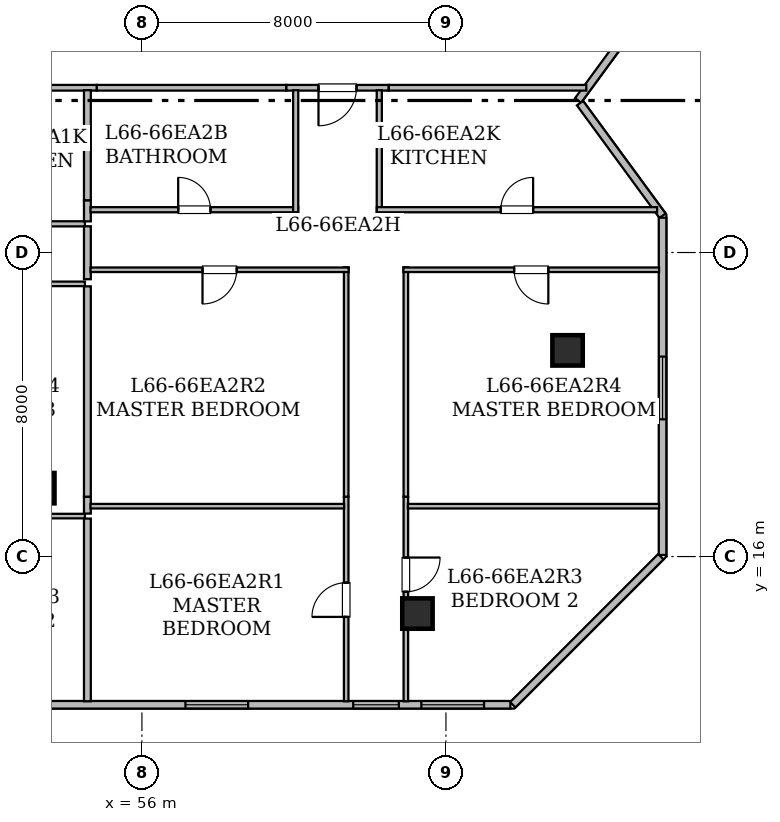
"""IFC4 building model, lengths in metres.
Left out: names, types, materials, properties, quantities, classifications, styles, units other than length and angle.
Written with IfcOpenShell. Run it as: python <this file> out.ifc"""

import sys

from ifc_helpers import new_model, si_unit, direction, frame, frame_2d, origin, origin_2d, place, context, subcontext, project, spatial, rectangle, hollow_rectangle, extrude, element, fill, save


model = new_model("IFC4")
c1 = context("Model", 3, precision=1e-05, world=origin(), true_north=direction((0.0, 1.0)))
c2 = subcontext(c1, "Body", "Model", "MODEL_VIEW")
j1 = project(units=[si_unit("LENGTHUNIT", "METRE"), si_unit("PLANEANGLEUNIT", "RADIAN")], contexts=[c1])
p1 = place(None, origin())
s1 = spatial("IfcSite", under=j1, at=p1, CompositionType="ELEMENT")
p2 = place(p1, origin())
s2 = spatial("IfcBuilding", under=s1, at=p2, CompositionType="ELEMENT")
p3 = place(p2, frame((0.0, 0.0, 257.35)))
s3 = spatial("IfcBuildingStorey", under=s2, at=p3, CompositionType="ELEMENT", Elevation=257.35)
for number, where, z_axis, x_axis in (
    (1, (63.25, 14.5, 0.0), (0.0, 0.0, 1.0), (1.0, 0.0, 0.0)),
    (2, (67.2, 21.425, 0.0), (0.0, 0.0, 1.0), (1.0, 0.0, 0.0)),
    (3, (53.3, 17.8, 0.0), (0.0, 0.0, 1.0), (1.0, 0.0, 0.0)),
):
    element("IfcColumn", number, at=place(p3, frame(where, z_axis=z_axis, x_axis=x_axis)), inside=s3, PredefinedType="COLUMN", context=c2, shape_type="SweptSolid", body=[
        extrude(hollow_rectangle(XDim=0.8, YDim=0.8, WallThickness=0.04, at=origin_2d()), origin(), (0.0, 0.0, 1.0), 3.65),
    ])
p4 = place(p3, frame((69.67, 30.992, 0.0), z_axis=(0.0, 0.0, 1.0), x_axis=(-0.591320870733, -0.806436375566, 0.0)))
e4 = element("IfcWall", 4, at=p4, inside=s3, PredefinedType="STANDARD", context=c2, shape_type="SweptSolid", body=[
    extrude(rectangle(XDim=3.71, YDim=0.2, at=frame_2d((1.855, 0.0))), origin(), (0.0, 0.0, 1.0), 3.43),
])
p5 = place(p3, frame((67.527, 27.931, 0.0), z_axis=(0.0, 0.0, 1.0), x_axis=(0.591248456881, -0.80648946815, 0.0)))
e5 = element("IfcWall", 5, at=p5, inside=s3, PredefinedType="STANDARD", context=c2, shape_type="SweptSolid", body=[
    extrude(rectangle(XDim=3.675, YDim=0.2, at=frame_2d((1.837, 0.0))), origin(), (0.0, 0.0, 1.0), 3.43),
])
p6 = place(p3, frame((69.7, 24.916, 0.0), z_axis=(0.0, 0.0, 1.0), x_axis=(0.0, -1.0, 0.0)))
e6 = element("IfcWall", 6, at=p6, inside=s3, PredefinedType="STANDARD", context=c2, shape_type="SweptSolid", body=[
    extrude(rectangle(XDim=8.875, YDim=0.2, at=frame_2d((4.438, 0.0))), origin(), (0.0, 0.0, 1.0), 3.43),
])
p7 = place(p6, frame((3.655, 0.0, 0.85)))
e7 = element("IfcOpeningElement", 7, at=p7, cuts=e6, PredefinedType="OPENING", context=c2, shape_type="SweptSolid", body=[
    extrude(rectangle(XDim=1.65, YDim=1.55, at=frame_2d((0.825, 0.775))), frame((0.0, 0.11, 0.0), z_axis=(0.0, -1.0, 0.0), x_axis=(1.0, 0.0, 0.0)), (0.0, 0.0, 1.0), 0.22),
])
p8 = place(p3, frame((69.655, 15.996, 0.0), z_axis=(0.0, 0.0, 1.0), x_axis=(-0.707106781187, -0.707106781187, 0.0)))
e8 = element("IfcWall", 8, at=p8, inside=s3, PredefinedType="STANDARD", context=c2, shape_type="SweptSolid", body=[
    extrude(rectangle(XDim=5.51, YDim=0.2, at=frame_2d((2.755, 0.0))), origin(), (0.0, 0.0, 1.0), 3.43),
])
p9 = place(p3, frame((65.696, 12.1, 0.0), z_axis=(0.0, 0.0, 1.0), x_axis=(-1.0, 0.0, 0.0)))
e9 = element("IfcWall", 9, at=p9, inside=s3, PredefinedType="STANDARD", context=c2, shape_type="SweptSolid", body=[
    extrude(rectangle(XDim=41.393, YDim=0.2, at=frame_2d((20.697, 0.0))), origin(), (0.0, 0.0, 1.0), 3.43),
])
p10 = place(p9, frame((33.821, 0.0, 0.85)))
e10 = element("IfcOpeningElement", 10, at=p10, cuts=e9, PredefinedType="OPENING", context=c2, shape_type="SweptSolid", body=[
    extrude(rectangle(XDim=1.65, YDim=1.55, at=frame_2d((0.825, 0.775))), frame((0.0, 0.11, 0.0), z_axis=(0.0, -1.0, 0.0), x_axis=(1.0, 0.0, 0.0)), (0.0, 0.0, 1.0), 0.22),
])
p11 = place(p9, frame((39.16, 0.0, 0.85)))
e11 = element("IfcOpeningElement", 11, at=p11, cuts=e9, PredefinedType="OPENING", context=c2, shape_type="SweptSolid", body=[
    extrude(rectangle(XDim=1.65, YDim=1.55, at=frame_2d((0.825, 0.775))), frame((0.0, 0.11, 0.0), z_axis=(0.0, -1.0, 0.0), x_axis=(1.0, 0.0, 0.0)), (0.0, 0.0, 1.0), 0.22),
])
p12 = place(p9, frame((17.006, 0.0, 0.8)))
e12 = element("IfcOpeningElement", 12, at=p12, cuts=e9, PredefinedType="OPENING", context=c2, shape_type="SweptSolid", body=[
    extrude(rectangle(XDim=1.2, YDim=1.5, at=frame_2d((0.6, 0.75))), frame((0.0, 0.11, 0.0), z_axis=(0.0, -1.0, 0.0), x_axis=(1.0, 0.0, 0.0)), (0.0, 0.0, 1.0), 0.22),
])
p13 = place(p9, frame((20.411, 0.0, 0.85)))
e13 = element("IfcOpeningElement", 13, at=p13, cuts=e9, PredefinedType="OPENING", context=c2, shape_type="SweptSolid", body=[
    extrude(rectangle(XDim=1.65, YDim=1.55, at=frame_2d((0.825, 0.775))), frame((0.0, 0.11, 0.0), z_axis=(0.0, -1.0, 0.0), x_axis=(1.0, 0.0, 0.0)), (0.0, 0.0, 1.0), 0.22),
])
p14 = place(p9, frame((13.151, 0.0, 0.85)))
e14 = element("IfcOpeningElement", 14, at=p14, cuts=e9, PredefinedType="OPENING", context=c2, shape_type="SweptSolid", body=[
    extrude(rectangle(XDim=1.65, YDim=1.55, at=frame_2d((0.825, 0.775))), frame((0.0, 0.11, 0.0), z_axis=(0.0, -1.0, 0.0), x_axis=(1.0, 0.0, 0.0)), (0.0, 0.0, 1.0), 0.22),
])
p15 = place(p9, frame((2.936, 0.0, 0.8)))
e15 = element("IfcOpeningElement", 15, at=p15, cuts=e9, PredefinedType="OPENING", context=c2, shape_type="SweptSolid", body=[
    extrude(rectangle(XDim=1.2, YDim=1.5, at=frame_2d((0.6, 0.75))), frame((0.0, 0.11, 0.0), z_axis=(0.0, -1.0, 0.0), x_axis=(1.0, 0.0, 0.0)), (0.0, 0.0, 1.0), 0.22),
])
p16 = place(p9, frame((6.901, 0.0, 0.85)))
e16 = element("IfcOpeningElement", 16, at=p16, cuts=e9, PredefinedType="OPENING", context=c2, shape_type="SweptSolid", body=[
    extrude(rectangle(XDim=1.65, YDim=1.55, at=frame_2d((0.825, 0.775))), frame((0.0, 0.11, 0.0), z_axis=(0.0, -1.0, 0.0), x_axis=(1.0, 0.0, 0.0)), (0.0, 0.0, 1.0), 0.22),
])
p17 = place(p9, frame((0.693, 0.0, 0.85)))
e17 = element("IfcOpeningElement", 17, at=p17, cuts=e9, PredefinedType="OPENING", context=c2, shape_type="SweptSolid", body=[
    extrude(rectangle(XDim=1.65, YDim=1.55, at=frame_2d((0.825, 0.775))), frame((0.0, 0.11, 0.0), z_axis=(0.0, -1.0, 0.0), x_axis=(1.0, 0.0, 0.0)), (0.0, 0.0, 1.0), 0.22),
])
p18 = place(p3, frame((54.814, 28.335, 0.0), z_axis=(0.0, 0.0, 1.0), x_axis=(-1.0, 0.0, 0.0)))
e18 = element("IfcWall", 18, at=p18, inside=s3, PredefinedType="STANDARD", context=c2, shape_type="SweptSolid", body=[
    extrude(rectangle(XDim=5.375, YDim=0.15, at=frame_2d((2.688, 0.0))), origin(), (0.0, 0.0, 1.0), 2.725),
])
p19 = place(p3, frame((62.495, 28.335, 0.0), z_axis=(0.0, 0.0, 1.0), x_axis=(-1.0, 0.0, 0.0)))
e19 = element("IfcWall", 19, at=p19, inside=s3, PredefinedType="STANDARD", context=c2, shape_type="SweptSolid", body=[
    extrude(rectangle(XDim=2.699, YDim=0.15, at=frame_2d((1.35, 0.0))), origin(), (0.0, 0.0, 1.0), 3.43),
])
p20 = place(p19, frame((0.849, 0.0, 0.0)))
e20 = element("IfcOpeningElement", 20, at=p20, cuts=e19, PredefinedType="OPENING", context=c2, shape_type="SweptSolid", body=[
    extrude(rectangle(XDim=1.0, YDim=2.15, at=frame_2d((0.5, 1.075))), frame((0.0, 0.085, 0.0), z_axis=(0.0, -1.0, 0.0), x_axis=(1.0, 0.0, 0.0)), (0.0, 0.0, 1.0), 0.17),
])
p21 = place(p3, frame((59.796, 28.335, 0.0), z_axis=(0.0, 0.0, 1.0), x_axis=(-1.0, 0.0, 0.0)))
e21 = element("IfcWall", 21, at=p21, inside=s3, PredefinedType="STANDARD", context=c2, shape_type="SweptSolid", body=[
    extrude(rectangle(XDim=4.982, YDim=0.15, at=frame_2d((2.491, 0.0))), origin(), (0.0, 0.0, 1.0), 3.43),
])
p22 = place(p3, frame((67.694, 28.335, 0.0), z_axis=(0.0, 0.0, 1.0), x_axis=(-1.0, 0.0, 0.0)))
e22 = element("IfcWall", 22, at=p22, inside=s3, PredefinedType="STANDARD", context=c2, shape_type="SweptSolid", body=[
    extrude(rectangle(XDim=5.199, YDim=0.15, at=frame_2d((2.6, 0.0))), origin(), (0.0, 0.0, 1.0), 2.887),
])
p23 = place(p3, frame((49.125, 24.755, 0.0), z_axis=(0.0, 0.0, 1.0), x_axis=(1.0, 0.0, 0.0)))
e23 = element("IfcWall", 23, at=p23, inside=s3, PredefinedType="PARTITIONING", context=c2, shape_type="SweptSolid", body=[
    extrude(rectangle(XDim=5.375, YDim=0.135, at=frame_2d((2.688, 0.0))), origin(), (0.0, 0.0, 1.0), 2.725),
])
p24 = place(p23, frame((2.263, 0.0, 0.0)))
e24 = element("IfcOpeningElement", 24, at=p24, cuts=e23, PredefinedType="OPENING", context=c2, shape_type="SweptSolid", body=[
    extrude(rectangle(XDim=0.85, YDim=2.1, at=frame_2d((0.425, 1.05))), frame((0.0, 0.077, 0.0), z_axis=(0.0, -1.0, 0.0), x_axis=(1.0, 0.0, 0.0)), (0.0, 0.0, 1.0), 0.155),
])
p25 = place(p3, frame((54.5, 23.175, 0.0), z_axis=(0.0, 0.0, 1.0), x_axis=(-1.0, 0.0, 0.0)))
e25 = element("IfcWall", 25, at=p25, inside=s3, PredefinedType="PARTITIONING", context=c2, shape_type="SweptSolid", body=[
    extrude(rectangle(XDim=5.69, YDim=0.12, at=frame_2d((2.845, 0.0))), origin(), (0.0, 0.0, 1.0), 2.725),
])
p26 = place(p3, frame((54.565, 24.69, 0.0), z_axis=(0.0, 0.0, 1.0), x_axis=(0.0, -1.0, 0.0)))
e26 = element("IfcWall", 26, at=p26, inside=s3, PredefinedType="STANDARD", context=c2, shape_type="SweptSolid", body=[
    extrude(rectangle(XDim=1.393, YDim=0.18, at=frame_2d((0.696, 0.0))), origin(), (0.0, 0.0, 1.0), 2.687),
])
p27 = place(p3, frame((54.565, 25.375, 0.0), z_axis=(0.0, 0.0, 1.0), x_axis=(0.0, -1.0, 0.0)))
e27 = element("IfcWall", 27, at=p27, inside=s3, PredefinedType="STANDARD", context=c2, shape_type="SweptSolid", body=[
    extrude(rectangle(XDim=0.555, YDim=0.18, at=frame_2d((0.277, 0.0))), origin(), (0.0, 0.0, 1.0), 3.43),
])
p28 = place(p3, frame((54.565, 28.27, 0.0), z_axis=(0.0, 0.0, 1.0), x_axis=(0.0, -1.0, 0.0)))
e28 = element("IfcWall", 28, at=p28, inside=s3, PredefinedType="STANDARD", context=c2, shape_type="SweptSolid", body=[
    extrude(rectangle(XDim=2.895, YDim=0.18, at=frame_2d((1.448, 0.0))), origin(), (0.0, 0.0, 1.0), 3.43),
])
p29 = place(p3, frame((48.929, 17.065, 0.0), z_axis=(0.0, 0.0, 1.0), x_axis=(1.0, 0.0, 0.0)))
e29 = element("IfcWall", 29, at=p29, inside=s3, PredefinedType="PARTITIONING", context=c2, shape_type="SweptSolid", body=[
    extrude(rectangle(XDim=5.571, YDim=0.12, at=frame_2d((2.786, 0.0))), origin(), (0.0, 0.0, 1.0), 2.725),
])
p30 = place(p3, frame((54.565, 17.0, 0.0), z_axis=(0.0, 0.0, 1.0), x_axis=(0.0, -1.0, 0.0)))
e30 = element("IfcWall", 30, at=p30, inside=s3, PredefinedType="STANDARD", context=c2, shape_type="SweptSolid", body=[
    extrude(rectangle(XDim=4.808, YDim=0.18, at=frame_2d((2.404, 0.0))), origin(), (0.0, 0.0, 1.0), 2.887),
])
p31 = place(p3, frame((54.565, 17.575, 0.0), z_axis=(0.0, 0.0, 1.0), x_axis=(0.0, -1.0, 0.0)))
e31 = element("IfcWall", 31, at=p31, inside=s3, PredefinedType="STANDARD", context=c2, shape_type="SweptSolid", body=[
    extrude(rectangle(XDim=0.445, YDim=0.18, at=frame_2d((0.223, 0.0))), origin(), (0.0, 0.0, 1.0), 2.725),
])
p32 = place(p3, frame((54.565, 23.11, 0.0), z_axis=(0.0, 0.0, 1.0), x_axis=(0.0, -1.0, 0.0)))
e32 = element("IfcWall", 32, at=p32, inside=s3, PredefinedType="STANDARD", context=c2, shape_type="SweptSolid", body=[
    extrude(rectangle(XDim=5.535, YDim=0.18, at=frame_2d((2.768, 0.0))), origin(), (0.0, 0.0, 1.0), 2.687),
])
p33 = place(p3, frame((54.647, 25.126, 0.0), z_axis=(0.0, 0.0, 1.0), x_axis=(1.0, 0.0, 0.0)))
e33 = element("IfcWall", 33, at=p33, inside=s3, PredefinedType="PARTITIONING", context=c2, shape_type="SweptSolid", body=[
    extrude(rectangle(XDim=5.464, YDim=0.135, at=frame_2d((2.732, 0.0))), origin(), (0.0, 0.0, 1.0), 3.43),
])
p34 = place(p33, frame((2.307, 0.0, 0.0)))
e34 = element("IfcOpeningElement", 34, at=p34, cuts=e33, PredefinedType="OPENING", context=c2, shape_type="SweptSolid", body=[
    extrude(rectangle(XDim=0.85, YDim=2.1, at=frame_2d((0.425, 1.05))), frame((0.0, 0.077, 0.0), z_axis=(0.0, -1.0, 0.0), x_axis=(1.0, 0.0, 0.0)), (0.0, 0.0, 1.0), 0.155),
])
for number, where, z_axis, x_axis in (
    (35, (60.046, 25.061, 0.0), (0.0, 0.0, 1.0), (0.0, 1.0, 0.0)),
    (36, (62.246, 28.27, 0.0), (0.0, 0.0, 1.0), (0.0, -1.0, 0.0)),
):
    element("IfcWall", number, at=place(p3, frame(where, z_axis=z_axis, x_axis=x_axis)), inside=s3, PredefinedType="PARTITIONING", context=c2, shape_type="SweptSolid", body=[
        extrude(rectangle(XDim=3.209, YDim=0.135, at=frame_2d((1.604, 0.0))), origin(), (0.0, 0.0, 1.0), 3.43),
    ])
p35 = place(p3, frame((62.181, 25.126, 0.0), z_axis=(0.0, 0.0, 1.0), x_axis=(1.0, 0.0, 0.0)))
e37 = element("IfcWall", 37, at=p35, inside=s3, PredefinedType="PARTITIONING", context=c2, shape_type="SweptSolid", body=[
    extrude(rectangle(XDim=7.375, YDim=0.135, at=frame_2d((3.688, 0.0))), origin(), (0.0, 0.0, 1.0), 2.887),
])
p36 = place(p35, frame((3.263, 0.0, 0.0)))
e38 = element("IfcOpeningElement", 38, at=p36, cuts=e37, PredefinedType="OPENING", context=c2, shape_type="SweptSolid", body=[
    extrude(rectangle(XDim=0.85, YDim=2.1, at=frame_2d((0.425, 1.05))), frame((0.0, 0.077, 0.0), z_axis=(0.0, -1.0, 0.0), x_axis=(1.0, 0.0, 0.0)), (0.0, 0.0, 1.0), 0.155),
])
p37 = place(p3, frame((61.375, 12.192, 0.0), z_axis=(0.0, 0.0, 1.0), x_axis=(0.0, 1.0, 0.0)))
e39 = element("IfcWall", 39, at=p37, inside=s3, PredefinedType="PARTITIONING", context=c2, shape_type="SweptSolid", body=[
    extrude(rectangle(XDim=5.383, YDim=0.12, at=frame_2d((2.691, 0.0))), origin(), (0.0, 0.0, 1.0), 2.725),
])
p38 = place(p37, frame((2.22, 0.0, 0.0)))
e40 = element("IfcOpeningElement", 40, at=p38, cuts=e39, PredefinedType="OPENING", context=c2, shape_type="SweptSolid", body=[
    extrude(rectangle(XDim=0.9, YDim=2.1, at=frame_2d((0.45, 1.05))), frame((0.0, 0.07, 0.0), z_axis=(0.0, -1.0, 0.0), x_axis=(1.0, 0.0, 0.0)), (0.0, 0.0, 1.0), 0.14),
])
p39 = place(p3, frame((61.375, 17.575, 0.0), z_axis=(0.0, 0.0, 1.0), x_axis=(0.0, 1.0, 0.0)))
e41 = element("IfcWall", 41, at=p39, inside=s3, PredefinedType="PARTITIONING", context=c2, shape_type="SweptSolid", body=[
    extrude(rectangle(XDim=6.036, YDim=0.12, at=frame_2d((3.018, 0.0))), origin(), (0.0, 0.0, 1.0), 2.687),
])
p40 = place(p3, frame((61.44, 23.546, 0.0), z_axis=(0.0, 0.0, 1.0), x_axis=(-1.0, 0.0, 0.0)))
e42 = element("IfcWall", 42, at=p40, inside=s3, PredefinedType="PARTITIONING", context=c2, shape_type="SweptSolid", body=[
    extrude(rectangle(XDim=6.793, YDim=0.12, at=frame_2d((3.396, 0.0))), origin(), (0.0, 0.0, 1.0), 2.687),
])
p41 = place(p40, frame((2.946, 0.0, 0.0)))
e43 = element("IfcOpeningElement", 43, at=p41, cuts=e42, PredefinedType="OPENING", context=c2, shape_type="SweptSolid", body=[
    extrude(rectangle(XDim=0.9, YDim=2.1, at=frame_2d((0.45, 1.05))), frame((0.0, 0.07, 0.0), z_axis=(0.0, -1.0, 0.0), x_axis=(1.0, 0.0, 0.0)), (0.0, 0.0, 1.0), 0.14),
])
p42 = place(p3, frame((62.945, 17.575, 0.0), z_axis=(0.0, 0.0, 1.0), x_axis=(0.0, -1.0, 0.0)))
e44 = element("IfcWall", 44, at=p42, inside=s3, PredefinedType="PARTITIONING", context=c2, shape_type="SweptSolid", body=[
    extrude(rectangle(XDim=5.383, YDim=0.12, at=frame_2d((2.691, 0.0))), origin(), (0.0, 0.0, 1.0), 2.725),
])
p43 = place(p42, frame((1.601, 0.0, 0.0)))
e45 = element("IfcOpeningElement", 45, at=p43, cuts=e44, PredefinedType="OPENING", context=c2, shape_type="SweptSolid", body=[
    extrude(rectangle(XDim=0.9, YDim=2.1, at=frame_2d((0.45, 1.05))), frame((0.0, 0.07, 0.0), z_axis=(0.0, -1.0, 0.0), x_axis=(1.0, 0.0, 0.0)), (0.0, 0.0, 1.0), 0.14),
])
p44 = place(p3, frame((62.945, 23.611, 0.0), z_axis=(0.0, 0.0, 1.0), x_axis=(0.0, -1.0, 0.0)))
e46 = element("IfcWall", 46, at=p44, inside=s3, PredefinedType="PARTITIONING", context=c2, shape_type="SweptSolid", body=[
    extrude(rectangle(XDim=6.036, YDim=0.12, at=frame_2d((3.018, 0.0))), origin(), (0.0, 0.0, 1.0), 2.687),
])
p45 = place(p3, frame((69.608, 23.546, 0.0), z_axis=(0.0, 0.0, 1.0), x_axis=(-1.0, 0.0, 0.0)))
e47 = element("IfcWall", 47, at=p45, inside=s3, PredefinedType="PARTITIONING", context=c2, shape_type="SweptSolid", body=[
    extrude(rectangle(XDim=6.728, YDim=0.12, at=frame_2d((3.364, 0.0))), origin(), (0.0, 0.0, 1.0), 2.687),
])
p46 = place(p45, frame((2.914, 0.0, 0.0)))
e48 = element("IfcOpeningElement", 48, at=p46, cuts=e47, PredefinedType="OPENING", context=c2, shape_type="SweptSolid", body=[
    extrude(rectangle(XDim=0.9, YDim=2.1, at=frame_2d((0.45, 1.05))), frame((0.0, 0.07, 0.0), z_axis=(0.0, -1.0, 0.0), x_axis=(1.0, 0.0, 0.0)), (0.0, 0.0, 1.0), 0.14),
])
p47 = place(p3, frame((54.647, 17.325, 0.0), z_axis=(0.0, 0.0, 1.0), x_axis=(1.0, 0.0, 0.0)))
e49 = element("IfcWall", 49, at=p47, inside=s3, PredefinedType="PARTITIONING", context=c2, shape_type="SweptSolid", body=[
    extrude(rectangle(XDim=6.674, YDim=0.12, at=frame_2d((3.337, 0.0))), origin(), (0.0, 0.0, 1.0), 2.725),
])
p48 = place(p3, frame((62.999, 17.325, 0.0), z_axis=(0.0, 0.0, 1.0), x_axis=(1.0, 0.0, 0.0)))
e50 = element("IfcWall", 50, at=p48, inside=s3, PredefinedType="PARTITIONING", context=c2, shape_type="SweptSolid", body=[
    extrude(rectangle(XDim=6.609, YDim=0.12, at=frame_2d((3.304, 0.0))), origin(), (0.0, 0.0, 1.0), 2.887),
])
p49 = place(p15, origin())
e51 = element("IfcWindow", 51, at=p49, inside=s3, PartitioningType="SINGLE_PANEL", PredefinedType="WINDOW", context=c2, shape_type="SweptSolid", body=[
    extrude(rectangle(XDim=1.2, YDim=1.5, at=frame_2d((0.6, 0.75))), frame((0.0, 0.03, 0.0), z_axis=(0.0, -1.0, 0.0), x_axis=(1.0, 0.0, 0.0)), (0.0, 0.0, 1.0), 0.06),
])
fill(e15, e51)
p50 = place(p16, origin())
e52 = element("IfcWindow", 52, at=p50, inside=s3, PartitioningType="SINGLE_PANEL", PredefinedType="WINDOW", context=c2, shape_type="SweptSolid", body=[
    extrude(rectangle(XDim=1.65, YDim=1.55, at=frame_2d((0.825, 0.775))), frame((0.0, 0.03, 0.0), z_axis=(0.0, -1.0, 0.0), x_axis=(1.0, 0.0, 0.0)), (0.0, 0.0, 1.0), 0.06),
])
fill(e16, e52)
p51 = place(p17, origin())
e53 = element("IfcWindow", 53, at=p51, inside=s3, PartitioningType="SINGLE_PANEL", PredefinedType="WINDOW", context=c2, shape_type="SweptSolid", body=[
    extrude(rectangle(XDim=1.65, YDim=1.55, at=frame_2d((0.825, 0.775))), frame((0.0, 0.03, 0.0), z_axis=(0.0, -1.0, 0.0), x_axis=(1.0, 0.0, 0.0)), (0.0, 0.0, 1.0), 0.06),
])
fill(e17, e53)
p52 = place(p7, origin())
e54 = element("IfcWindow", 54, at=p52, inside=s3, PartitioningType="SINGLE_PANEL", PredefinedType="WINDOW", context=c2, shape_type="SweptSolid", body=[
    extrude(rectangle(XDim=1.65, YDim=1.55, at=frame_2d((0.825, 0.775))), frame((0.0, 0.03, 0.0), z_axis=(0.0, -1.0, 0.0), x_axis=(1.0, 0.0, 0.0)), (0.0, 0.0, 1.0), 0.06),
])
fill(e7, e54)
p53 = place(p20, origin())
e55 = element("IfcDoor", 55, at=p53, inside=s3, OperationType="SINGLE_SWING_RIGHT", PredefinedType="DOOR", context=c2, shape_type="SweptSolid", body=[
    extrude(rectangle(XDim=1.0, YDim=2.15, at=frame_2d((0.5, 1.075))), frame((0.0, 0.025, 0.0), z_axis=(0.0, -1.0, 0.0), x_axis=(1.0, 0.0, 0.0)), (0.0, 0.0, 1.0), 0.05),
])
fill(e20, e55)
p54 = place(p34, origin())
e56 = element("IfcDoor", 56, at=p54, inside=s3, OperationType="SINGLE_SWING_LEFT", PredefinedType="DOOR", context=c2, shape_type="SweptSolid", body=[
    extrude(rectangle(XDim=0.85, YDim=2.1, at=frame_2d((0.425, 1.05))), frame((0.0, 0.025, 0.0), z_axis=(0.0, -1.0, 0.0), x_axis=(1.0, 0.0, 0.0)), (0.0, 0.0, 1.0), 0.05),
])
fill(e34, e56)
p55 = place(p36, origin())
e57 = element("IfcDoor", 57, at=p55, inside=s3, OperationType="SINGLE_SWING_RIGHT", PredefinedType="DOOR", context=c2, shape_type="SweptSolid", body=[
    extrude(rectangle(XDim=0.85, YDim=2.1, at=frame_2d((0.425, 1.05))), frame((0.0, 0.025, 0.0), z_axis=(0.0, -1.0, 0.0), x_axis=(1.0, 0.0, 0.0)), (0.0, 0.0, 1.0), 0.05),
])
fill(e38, e57)
p56 = place(p38, origin())
e58 = element("IfcDoor", 58, at=p56, inside=s3, OperationType="SINGLE_SWING_LEFT", PredefinedType="DOOR", context=c2, shape_type="SweptSolid", body=[
    extrude(rectangle(XDim=0.9, YDim=2.1, at=frame_2d((0.45, 1.05))), frame((0.0, 0.025, 0.0), z_axis=(0.0, -1.0, 0.0), x_axis=(1.0, 0.0, 0.0)), (0.0, 0.0, 1.0), 0.05),
])
fill(e40, e58)
p57 = place(p41, origin())
e59 = element("IfcDoor", 59, at=p57, inside=s3, OperationType="SINGLE_SWING_RIGHT", PredefinedType="DOOR", context=c2, shape_type="SweptSolid", body=[
    extrude(rectangle(XDim=0.9, YDim=2.1, at=frame_2d((0.45, 1.05))), frame((0.0, 0.025, 0.0), z_axis=(0.0, -1.0, 0.0), x_axis=(1.0, 0.0, 0.0)), (0.0, 0.0, 1.0), 0.05),
])
fill(e43, e59)
p58 = place(p43, origin())
e60 = element("IfcDoor", 60, at=p58, inside=s3, OperationType="SINGLE_SWING_LEFT", PredefinedType="DOOR", context=c2, shape_type="SweptSolid", body=[
    extrude(rectangle(XDim=0.9, YDim=2.1, at=frame_2d((0.45, 1.05))), frame((0.0, 0.025, 0.0), z_axis=(0.0, -1.0, 0.0), x_axis=(1.0, 0.0, 0.0)), (0.0, 0.0, 1.0), 0.05),
])
fill(e45, e60)
p59 = place(p46, origin())
e61 = element("IfcDoor", 61, at=p59, inside=s3, OperationType="SINGLE_SWING_LEFT", PredefinedType="DOOR", context=c2, shape_type="SweptSolid", body=[
    extrude(rectangle(XDim=0.9, YDim=2.1, at=frame_2d((0.45, 1.05))), frame((0.0, 0.025, 0.0), z_axis=(0.0, -1.0, 0.0), x_axis=(1.0, 0.0, 0.0)), (0.0, 0.0, 1.0), 0.05),
])
fill(e48, e61)
save(model, sys.argv[1])
